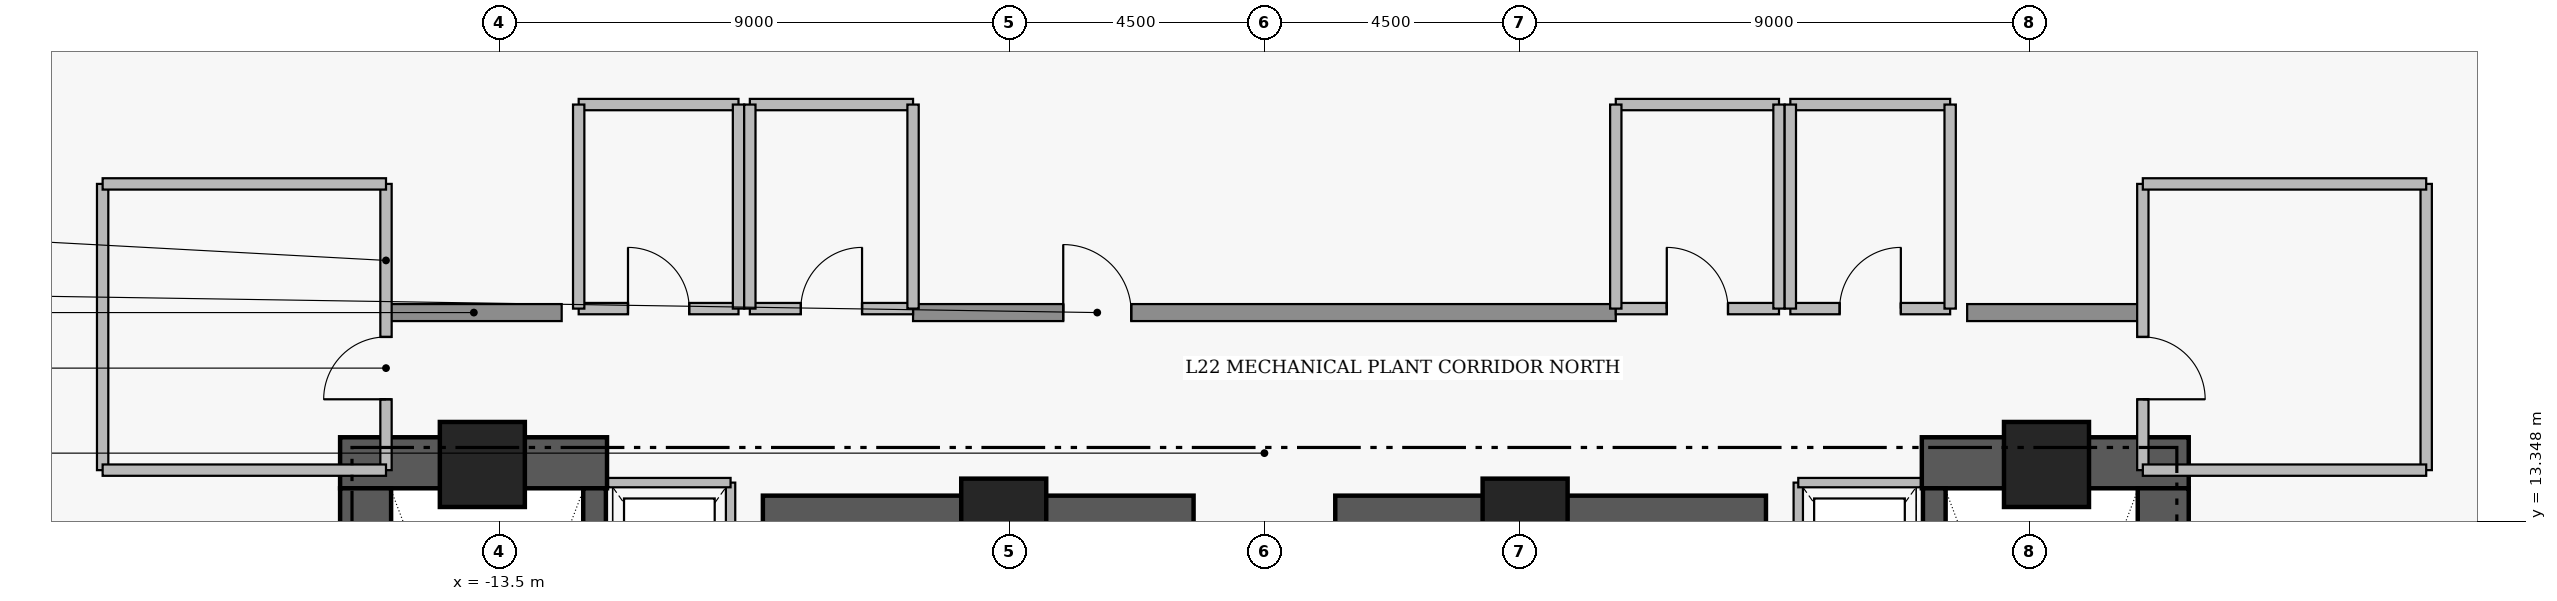
"""IFC4 building model, lengths in metres.
Left out: names, types, materials, properties, quantities, classifications, styles, units other than length and angle.
Written with IfcOpenShell. Run it as: python <this file> out.ifc"""

import sys

from ifc_helpers import new_model, si_unit, direction, frame, frame_2d, origin, origin_2d, place, context, subcontext, project, spatial, rectangle, extrude, element, fill, save


model = new_model("IFC4")
c1 = context("Model", 3, precision=1e-05, world=origin(), true_north=direction((0.0, 1.0)))
c2 = subcontext(c1, "Body", "Model", "MODEL_VIEW")
j1 = project(units=[si_unit("LENGTHUNIT", "METRE"), si_unit("PLANEANGLEUNIT", "RADIAN")], contexts=[c1])
p1 = place(None, origin())
s1 = spatial("IfcSite", under=j1, at=p1, CompositionType="ELEMENT")
p2 = place(p1, origin())
s2 = spatial("IfcBuilding", under=s1, at=p2, CompositionType="ELEMENT")
p3 = place(p2, frame((0.0, 0.0, 89.65)))
s3 = spatial("IfcBuildingStorey", under=s2, at=p3, CompositionType="ELEMENT", Elevation=89.65)
for number, where, z_axis, x_axis in (
    (1, (-16.31, 14.38, 0.0), (0.0, 0.0, 1.0), (1.0, 0.0, 0.0)),
    (2, (11.6, 14.38, 0.0), (0.0, 0.0, 1.0), (1.0, 0.0, 0.0)),
):
    element("IfcWall", number, at=place(p3, frame(where, z_axis=z_axis, x_axis=x_axis)), inside=s3, PredefinedType="SHEAR", context=c2, shape_type="SweptSolid", body=[
        extrude(rectangle(XDim=4.71, YDim=0.9, at=frame_2d((2.355, 0.0))), origin(), (0.0, 0.0, 1.0), 5.81),
    ])
for number, where, z_axis, x_axis in (
    (3, (-15.86, 4.97, 0.0), (0.0, 0.0, 1.0), (0.0, 1.0, 0.0)),
    (4, (15.86, 4.97, 0.0), (0.0, 0.0, 1.0), (0.0, 1.0, 0.0)),
):
    element("IfcWall", number, at=place(p3, frame(where, z_axis=z_axis, x_axis=x_axis)), inside=s3, PredefinedType="SHEAR", context=c2, shape_type="SweptSolid", body=[
        extrude(rectangle(XDim=8.96, YDim=0.9, at=frame_2d((4.48, 0.0))), origin(), (0.0, 0.0, 1.0), 5.81),
    ])
for number, where, z_axis, x_axis in (
    (5, (-8.85, 13.35, 0.0), (0.0, 0.0, 1.0), (1.0, 0.0, 0.0)),
    (6, (1.25, 13.35, 0.0), (0.0, 0.0, 1.0), (1.0, 0.0, 0.0)),
):
    element("IfcWall", number, at=place(p3, frame(where, z_axis=z_axis, x_axis=x_axis)), inside=s3, PredefinedType="SHEAR", context=c2, shape_type="SweptSolid", body=[
        extrude(rectangle(XDim=7.6, YDim=0.9, at=frame_2d((3.8, 0.0))), origin(), (0.0, 0.0, 1.0), 5.74),
    ])
p4 = place(p3, frame((-11.82, 4.97, 0.0), z_axis=(0.0, 0.0, 1.0), x_axis=(0.0, 1.0, 0.0)))
e7 = element("IfcWall", 7, at=p4, inside=s3, PredefinedType="SHEAR", context=c2, shape_type="SweptSolid", body=[
    extrude(rectangle(XDim=8.96, YDim=0.4, at=frame_2d((4.48, 0.0))), origin(), (0.0, 0.0, 1.0), 5.81),
])
p5 = place(p4, frame((0.31, 0.0, 0.0)))
e8 = element("IfcOpeningElement", 8, at=p5, cuts=e7, PredefinedType="OPENING", context=c2, shape_type="SweptSolid", body=[
    extrude(rectangle(XDim=1.12, YDim=2.22, at=frame_2d((0.56, 1.11))), frame((0.0, 0.21, 0.0), z_axis=(0.0, -1.0, 0.0), x_axis=(1.0, 0.0, 0.0)), (0.0, 0.0, 1.0), 0.42),
])
p6 = place(p3, frame((11.82, 13.93, 0.0), z_axis=(0.0, 0.0, 1.0), x_axis=(0.0, -1.0, 0.0)))
e9 = element("IfcWall", 9, at=p6, inside=s3, PredefinedType="SHEAR", context=c2, shape_type="SweptSolid", body=[
    extrude(rectangle(XDim=8.96, YDim=0.4, at=frame_2d((4.48, 0.0))), origin(), (0.0, 0.0, 1.0), 5.81),
])
p7 = place(p6, frame((7.53, 0.0, 0.0)))
e10 = element("IfcOpeningElement", 10, at=p7, cuts=e9, PredefinedType="OPENING", context=c2, shape_type="SweptSolid", body=[
    extrude(rectangle(XDim=1.12, YDim=2.22, at=frame_2d((0.56, 1.11))), frame((0.0, 0.21, 0.0), z_axis=(0.0, -1.0, 0.0), x_axis=(1.0, 0.0, 0.0)), (0.0, 0.0, 1.0), 0.42),
])
for number, where, z_axis, x_axis in (
    (11, (-13.8, 14.35, 0.0), (0.0, 0.0, 1.0), (1.0, 0.0, 0.0)),
    (12, (-4.6, 13.35, 0.0), (0.0, 0.0, 1.0), (1.0, 0.0, 0.0)),
    (13, (4.6, 13.35, 0.0), (0.0, 0.0, 1.0), (1.0, 0.0, 0.0)),
    (14, (13.8, 14.35, 0.0), (0.0, 0.0, 1.0), (1.0, 0.0, 0.0)),
):
    element("IfcColumn", number, at=place(p3, frame(where, z_axis=z_axis, x_axis=x_axis)), inside=s3, PredefinedType="COLUMN", context=c2, shape_type="SweptSolid", body=[
        extrude(rectangle(XDim=1.5, YDim=1.5, at=origin_2d()), origin(), (0.0, 0.0, 1.0), 6.0),
    ])
for number, where, z_axis, x_axis in (
    (15, (-15.5, 17.03, 0.0), (0.0, 0.0, 1.0), (1.0, 0.0, 0.0)),
    (16, (12.4, 17.03, 0.0), (0.0, 0.0, 1.0), (1.0, 0.0, 0.0)),
):
    element("IfcWall", number, at=place(p3, frame(where, z_axis=z_axis, x_axis=x_axis)), inside=s3, PredefinedType="STANDARD", context=c2, shape_type="SweptSolid", body=[
        extrude(rectangle(XDim=3.1, YDim=0.3, at=frame_2d((1.55, 0.0))), origin(), (0.0, 0.0, 1.0), 5.74),
    ])
p8 = place(p3, frame((-6.2, 17.03, 0.0), z_axis=(0.0, 0.0, 1.0), x_axis=(1.0, 0.0, 0.0)))
e17 = element("IfcWall", 17, at=p8, inside=s3, PredefinedType="STANDARD", context=c2, shape_type="SweptSolid", body=[
    extrude(rectangle(XDim=12.4, YDim=0.3, at=frame_2d((6.2, 0.0))), origin(), (0.0, 0.0, 1.0), 5.74),
])
p9 = place(p8, frame((2.65, 0.0, 0.0)))
e18 = element("IfcOpeningElement", 18, at=p9, cuts=e17, PredefinedType="OPENING", context=c2, shape_type="SweptSolid", body=[
    extrude(rectangle(XDim=1.2, YDim=2.2, at=frame_2d((0.6, 1.1))), frame((0.0, 0.16, 0.0), z_axis=(0.0, -1.0, 0.0), x_axis=(1.0, 0.0, 0.0)), (0.0, 0.0, 1.0), 0.32),
])
p10 = place(p3, frame((-15.5, 14.25, 0.0), z_axis=(0.0, 0.0, 1.0), x_axis=(0.0, 1.0, 0.0)))
e19 = element("IfcWall", 19, at=p10, inside=s3, PredefinedType="PARTITIONING", context=c2, shape_type="SweptSolid", body=[
    extrude(rectangle(XDim=5.05, YDim=0.2, at=frame_2d((2.525, 0.0))), origin(), (0.0, 0.0, 1.0), 5.74),
])
p11 = place(p10, frame((1.25, 0.0, 0.0)))
e20 = element("IfcOpeningElement", 20, at=p11, cuts=e19, PredefinedType="OPENING", context=c2, shape_type="SweptSolid", body=[
    extrude(rectangle(XDim=1.1, YDim=2.2, at=frame_2d((0.55, 1.1))), frame((0.0, 0.11, 0.0), z_axis=(0.0, -1.0, 0.0), x_axis=(1.0, 0.0, 0.0)), (0.0, 0.0, 1.0), 0.22),
])
p12 = place(p3, frame((15.5, 19.3, 0.0), z_axis=(0.0, 0.0, 1.0), x_axis=(0.0, -1.0, 0.0)))
e21 = element("IfcWall", 21, at=p12, inside=s3, PredefinedType="PARTITIONING", context=c2, shape_type="SweptSolid", body=[
    extrude(rectangle(XDim=5.05, YDim=0.2, at=frame_2d((2.525, 0.0))), origin(), (0.0, 0.0, 1.0), 5.74),
])
p13 = place(p12, frame((2.7, 0.0, 0.0)))
e22 = element("IfcOpeningElement", 22, at=p13, cuts=e21, PredefinedType="OPENING", context=c2, shape_type="SweptSolid", body=[
    extrude(rectangle(XDim=1.1, YDim=2.2, at=frame_2d((0.55, 1.1))), frame((0.0, 0.11, 0.0), z_axis=(0.0, -1.0, 0.0), x_axis=(1.0, 0.0, 0.0)), (0.0, 0.0, 1.0), 0.22),
])
p14 = place(p3, frame((-12.1, 17.1, 0.0), z_axis=(0.0, 0.0, 1.0), x_axis=(1.0, 0.0, 0.0)))
e23 = element("IfcWall", 23, at=p14, inside=s3, PredefinedType="PARTITIONING", context=c2, shape_type="SweptSolid", body=[
    extrude(rectangle(XDim=2.82, YDim=0.2, at=frame_2d((1.41, 0.0))), origin(), (0.0, 0.0, 1.0), 5.74),
])
p15 = place(p14, frame((0.87, 0.0, 0.0)))
e24 = element("IfcOpeningElement", 24, at=p15, cuts=e23, PredefinedType="OPENING", context=c2, shape_type="SweptSolid", body=[
    extrude(rectangle(XDim=1.08, YDim=2.18, at=frame_2d((0.54, 1.09))), frame((0.0, 0.11, 0.0), z_axis=(0.0, -1.0, 0.0), x_axis=(1.0, 0.0, 0.0)), (0.0, 0.0, 1.0), 0.22),
])
p16 = place(p3, frame((-9.08, 17.1, 0.0), z_axis=(0.0, 0.0, 1.0), x_axis=(1.0, 0.0, 0.0)))
e25 = element("IfcWall", 25, at=p16, inside=s3, PredefinedType="PARTITIONING", context=c2, shape_type="SweptSolid", body=[
    extrude(rectangle(XDim=2.88, YDim=0.2, at=frame_2d((1.44, 0.0))), origin(), (0.0, 0.0, 1.0), 5.74),
])
p17 = place(p16, frame((0.9, 0.0, 0.0)))
e26 = element("IfcOpeningElement", 26, at=p17, cuts=e25, PredefinedType="OPENING", context=c2, shape_type="SweptSolid", body=[
    extrude(rectangle(XDim=1.08, YDim=2.18, at=frame_2d((0.54, 1.09))), frame((0.0, 0.11, 0.0), z_axis=(0.0, -1.0, 0.0), x_axis=(1.0, 0.0, 0.0)), (0.0, 0.0, 1.0), 0.22),
])
p18 = place(p3, frame((6.2, 17.1, 0.0), z_axis=(0.0, 0.0, 1.0), x_axis=(1.0, 0.0, 0.0)))
e27 = element("IfcWall", 27, at=p18, inside=s3, PredefinedType="PARTITIONING", context=c2, shape_type="SweptSolid", body=[
    extrude(rectangle(XDim=2.88, YDim=0.2, at=frame_2d((1.44, 0.0))), origin(), (0.0, 0.0, 1.0), 5.74),
])
p19 = place(p18, frame((0.9, 0.0, 0.0)))
e28 = element("IfcOpeningElement", 28, at=p19, cuts=e27, PredefinedType="OPENING", context=c2, shape_type="SweptSolid", body=[
    extrude(rectangle(XDim=1.08, YDim=2.18, at=frame_2d((0.54, 1.09))), frame((0.0, 0.11, 0.0), z_axis=(0.0, -1.0, 0.0), x_axis=(1.0, 0.0, 0.0)), (0.0, 0.0, 1.0), 0.22),
])
p20 = place(p3, frame((9.28, 17.1, 0.0), z_axis=(0.0, 0.0, 1.0), x_axis=(1.0, 0.0, 0.0)))
e29 = element("IfcWall", 29, at=p20, inside=s3, PredefinedType="PARTITIONING", context=c2, shape_type="SweptSolid", body=[
    extrude(rectangle(XDim=2.82, YDim=0.2, at=frame_2d((1.41, 0.0))), origin(), (0.0, 0.0, 1.0), 5.74),
])
p21 = place(p20, frame((0.87, 0.0, 0.0)))
e30 = element("IfcOpeningElement", 30, at=p21, cuts=e29, PredefinedType="OPENING", context=c2, shape_type="SweptSolid", body=[
    extrude(rectangle(XDim=1.08, YDim=2.18, at=frame_2d((0.54, 1.09))), frame((0.0, 0.11, 0.0), z_axis=(0.0, -1.0, 0.0), x_axis=(1.0, 0.0, 0.0)), (0.0, 0.0, 1.0), 0.22),
])
p22 = place(p3, frame((-9.42, 11.07, 0.0), z_axis=(0.0, 0.0, 1.0), x_axis=(0.0, 1.0, 0.0)))
e31 = element("IfcWall", 31, at=p22, inside=s3, PredefinedType="PARTITIONING", context=c2, shape_type="SweptSolid", body=[
    extrude(rectangle(XDim=2.96, YDim=0.165, at=frame_2d((1.48, 0.0))), origin(), (0.0, 0.0, 1.0), 5.74),
])
p23 = place(p3, frame((-11.58, 14.03, 0.0), z_axis=(0.0, 0.0, 1.0), x_axis=(1.0, 0.0, 0.0)))
e32 = element("IfcWall", 32, at=p23, inside=s3, PredefinedType="PARTITIONING", context=c2, shape_type="SweptSolid", body=[
    extrude(rectangle(XDim=2.16, YDim=0.165, at=frame_2d((1.08, 0.0))), origin(), (0.0, 0.0, 1.0), 5.74),
])
p24 = place(p3, frame((9.42, 11.07, 0.0), z_axis=(0.0, 0.0, 1.0), x_axis=(0.0, 1.0, 0.0)))
e33 = element("IfcWall", 33, at=p24, inside=s3, PredefinedType="PARTITIONING", context=c2, shape_type="SweptSolid", body=[
    extrude(rectangle(XDim=2.96, YDim=0.165, at=frame_2d((1.48, 0.0))), origin(), (0.0, 0.0, 1.0), 5.74),
])
p25 = place(p3, frame((9.42, 14.03, 0.0), z_axis=(0.0, 0.0, 1.0), x_axis=(1.0, 0.0, 0.0)))
e34 = element("IfcWall", 34, at=p25, inside=s3, PredefinedType="PARTITIONING", context=c2, shape_type="SweptSolid", body=[
    extrude(rectangle(XDim=2.16, YDim=0.165, at=frame_2d((1.08, 0.0))), origin(), (0.0, 0.0, 1.0), 5.74),
])
p26 = place(p3, frame((-20.5, 14.25, 0.0), z_axis=(0.0, 0.0, 1.0), x_axis=(0.0, 1.0, 0.0)))
e35 = element("IfcWall", 35, at=p26, inside=s3, PredefinedType="PARTITIONING", context=c2, shape_type="SweptSolid", body=[
    extrude(rectangle(XDim=5.05, YDim=0.2, at=frame_2d((2.525, 0.0))), origin(), (0.0, 0.0, 1.0), 5.74),
])
for number, where, z_axis, x_axis in (
    (36, (-20.5, 19.3, 0.0), (0.0, 0.0, 1.0), (1.0, 0.0, 0.0)),
    (37, (-20.5, 14.25, 0.0), (0.0, 0.0, 1.0), (1.0, 0.0, 0.0)),
):
    element("IfcWall", number, at=place(p3, frame(where, z_axis=z_axis, x_axis=x_axis)), inside=s3, PredefinedType="PARTITIONING", context=c2, shape_type="SweptSolid", body=[
        extrude(rectangle(XDim=5.0, YDim=0.2, at=frame_2d((2.5, 0.0))), origin(), (0.0, 0.0, 1.0), 5.74),
    ])
p27 = place(p3, frame((20.5, 14.25, 0.0), z_axis=(0.0, 0.0, 1.0), x_axis=(0.0, 1.0, 0.0)))
e38 = element("IfcWall", 38, at=p27, inside=s3, PredefinedType="PARTITIONING", context=c2, shape_type="SweptSolid", body=[
    extrude(rectangle(XDim=5.05, YDim=0.2, at=frame_2d((2.525, 0.0))), origin(), (0.0, 0.0, 1.0), 5.74),
])
for number, where, z_axis, x_axis in (
    (39, (15.5, 19.3, 0.0), (0.0, 0.0, 1.0), (1.0, 0.0, 0.0)),
    (40, (15.5, 14.25, 0.0), (0.0, 0.0, 1.0), (1.0, 0.0, 0.0)),
):
    element("IfcWall", number, at=place(p3, frame(where, z_axis=z_axis, x_axis=x_axis)), inside=s3, PredefinedType="PARTITIONING", context=c2, shape_type="SweptSolid", body=[
        extrude(rectangle(XDim=5.0, YDim=0.2, at=frame_2d((2.5, 0.0))), origin(), (0.0, 0.0, 1.0), 5.74),
    ])
p28 = place(p3, frame((-12.1, 20.7, 0.0), z_axis=(0.0, 0.0, 1.0), x_axis=(1.0, 0.0, 0.0)))
e41 = element("IfcWall", 41, at=p28, inside=s3, PredefinedType="PARTITIONING", context=c2, shape_type="SweptSolid", body=[
    extrude(rectangle(XDim=2.82, YDim=0.2, at=frame_2d((1.41, 0.0))), origin(), (0.0, 0.0, 1.0), 5.74),
])
for number, where, z_axis, x_axis in (
    (42, (-12.1, 17.1, 0.0), (0.0, 0.0, 1.0), (0.0, 1.0, 0.0)),
    (43, (-9.28, 17.1, 0.0), (0.0, 0.0, 1.0), (0.0, 1.0, 0.0)),
):
    element("IfcWall", number, at=place(p3, frame(where, z_axis=z_axis, x_axis=x_axis)), inside=s3, PredefinedType="PARTITIONING", context=c2, shape_type="SweptSolid", body=[
        extrude(rectangle(XDim=3.6, YDim=0.2, at=frame_2d((1.8, 0.0))), origin(), (0.0, 0.0, 1.0), 5.74),
    ])
p29 = place(p3, frame((-9.08, 20.7, 0.0), z_axis=(0.0, 0.0, 1.0), x_axis=(1.0, 0.0, 0.0)))
e44 = element("IfcWall", 44, at=p29, inside=s3, PredefinedType="PARTITIONING", context=c2, shape_type="SweptSolid", body=[
    extrude(rectangle(XDim=2.88, YDim=0.2, at=frame_2d((1.44, 0.0))), origin(), (0.0, 0.0, 1.0), 5.74),
])
for number, where, z_axis, x_axis in (
    (45, (-9.08, 17.1, 0.0), (0.0, 0.0, 1.0), (0.0, 1.0, 0.0)),
    (46, (-6.2, 17.1, 0.0), (0.0, 0.0, 1.0), (0.0, 1.0, 0.0)),
):
    element("IfcWall", number, at=place(p3, frame(where, z_axis=z_axis, x_axis=x_axis)), inside=s3, PredefinedType="PARTITIONING", context=c2, shape_type="SweptSolid", body=[
        extrude(rectangle(XDim=3.6, YDim=0.2, at=frame_2d((1.8, 0.0))), origin(), (0.0, 0.0, 1.0), 5.74),
    ])
p30 = place(p3, frame((6.2, 20.7, 0.0), z_axis=(0.0, 0.0, 1.0), x_axis=(1.0, 0.0, 0.0)))
e47 = element("IfcWall", 47, at=p30, inside=s3, PredefinedType="PARTITIONING", context=c2, shape_type="SweptSolid", body=[
    extrude(rectangle(XDim=2.88, YDim=0.2, at=frame_2d((1.44, 0.0))), origin(), (0.0, 0.0, 1.0), 5.74),
])
for number, where, z_axis, x_axis in (
    (48, (6.2, 17.1, 0.0), (0.0, 0.0, 1.0), (0.0, 1.0, 0.0)),
    (49, (9.08, 17.1, 0.0), (0.0, 0.0, 1.0), (0.0, 1.0, 0.0)),
):
    element("IfcWall", number, at=place(p3, frame(where, z_axis=z_axis, x_axis=x_axis)), inside=s3, PredefinedType="PARTITIONING", context=c2, shape_type="SweptSolid", body=[
        extrude(rectangle(XDim=3.6, YDim=0.2, at=frame_2d((1.8, 0.0))), origin(), (0.0, 0.0, 1.0), 5.74),
    ])
p31 = place(p3, frame((9.28, 20.7, 0.0), z_axis=(0.0, 0.0, 1.0), x_axis=(1.0, 0.0, 0.0)))
e50 = element("IfcWall", 50, at=p31, inside=s3, PredefinedType="PARTITIONING", context=c2, shape_type="SweptSolid", body=[
    extrude(rectangle(XDim=2.82, YDim=0.2, at=frame_2d((1.41, 0.0))), origin(), (0.0, 0.0, 1.0), 5.74),
])
for number, where, z_axis, x_axis in (
    (51, (9.28, 17.1, 0.0), (0.0, 0.0, 1.0), (0.0, 1.0, 0.0)),
    (52, (12.1, 17.1, 0.0), (0.0, 0.0, 1.0), (0.0, 1.0, 0.0)),
):
    element("IfcWall", number, at=place(p3, frame(where, z_axis=z_axis, x_axis=x_axis)), inside=s3, PredefinedType="PARTITIONING", context=c2, shape_type="SweptSolid", body=[
        extrude(rectangle(XDim=3.6, YDim=0.2, at=frame_2d((1.8, 0.0))), origin(), (0.0, 0.0, 1.0), 5.74),
    ])
p32 = place(p9, origin())
e53 = element("IfcDoor", 53, at=p32, inside=s3, OperationType="SINGLE_SWING_LEFT", PredefinedType="DOOR", context=c2, shape_type="SweptSolid", body=[
    extrude(rectangle(XDim=1.2, YDim=2.2, at=frame_2d((0.6, 1.1))), frame((0.0, 0.025, 0.0), z_axis=(0.0, -1.0, 0.0), x_axis=(1.0, 0.0, 0.0)), (0.0, 0.0, 1.0), 0.05),
])
fill(e18, e53)
p33 = place(p11, origin())
e54 = element("IfcDoor", 54, at=p33, inside=s3, OperationType="SINGLE_SWING_LEFT", PredefinedType="DOOR", context=c2, shape_type="SweptSolid", body=[
    extrude(rectangle(XDim=1.1, YDim=2.2, at=frame_2d((0.55, 1.1))), frame((0.0, 0.025, 0.0), z_axis=(0.0, -1.0, 0.0), x_axis=(1.0, 0.0, 0.0)), (0.0, 0.0, 1.0), 0.05),
])
fill(e20, e54)
p34 = place(p13, origin())
e55 = element("IfcDoor", 55, at=p34, inside=s3, OperationType="SINGLE_SWING_RIGHT", PredefinedType="DOOR", context=c2, shape_type="SweptSolid", body=[
    extrude(rectangle(XDim=1.1, YDim=2.2, at=frame_2d((0.55, 1.1))), frame((0.0, 0.025, 0.0), z_axis=(0.0, -1.0, 0.0), x_axis=(1.0, 0.0, 0.0)), (0.0, 0.0, 1.0), 0.05),
])
fill(e22, e55)
p35 = place(p15, origin())
e56 = element("IfcDoor", 56, at=p35, inside=s3, OperationType="SINGLE_SWING_LEFT", PredefinedType="DOOR", context=c2, shape_type="SweptSolid", body=[
    extrude(rectangle(XDim=1.08, YDim=2.18, at=frame_2d((0.54, 1.09))), frame((0.0, 0.025, 0.0), z_axis=(0.0, -1.0, 0.0), x_axis=(1.0, 0.0, 0.0)), (0.0, 0.0, 1.0), 0.05),
])
fill(e24, e56)
p36 = place(p17, origin())
e57 = element("IfcDoor", 57, at=p36, inside=s3, OperationType="SINGLE_SWING_RIGHT", PredefinedType="DOOR", context=c2, shape_type="SweptSolid", body=[
    extrude(rectangle(XDim=1.08, YDim=2.18, at=frame_2d((0.54, 1.09))), frame((0.0, 0.025, 0.0), z_axis=(0.0, -1.0, 0.0), x_axis=(1.0, 0.0, 0.0)), (0.0, 0.0, 1.0), 0.05),
])
fill(e26, e57)
p37 = place(p19, origin())
e58 = element("IfcDoor", 58, at=p37, inside=s3, OperationType="SINGLE_SWING_LEFT", PredefinedType="DOOR", context=c2, shape_type="SweptSolid", body=[
    extrude(rectangle(XDim=1.08, YDim=2.18, at=frame_2d((0.54, 1.09))), frame((0.0, 0.025, 0.0), z_axis=(0.0, -1.0, 0.0), x_axis=(1.0, 0.0, 0.0)), (0.0, 0.0, 1.0), 0.05),
])
fill(e28, e58)
p38 = place(p21, origin())
e59 = element("IfcDoor", 59, at=p38, inside=s3, OperationType="SINGLE_SWING_RIGHT", PredefinedType="DOOR", context=c2, shape_type="SweptSolid", body=[
    extrude(rectangle(XDim=1.08, YDim=2.18, at=frame_2d((0.54, 1.09))), frame((0.0, 0.025, 0.0), z_axis=(0.0, -1.0, 0.0), x_axis=(1.0, 0.0, 0.0)), (0.0, 0.0, 1.0), 0.05),
])
fill(e30, e59)
save(model, sys.argv[1])
